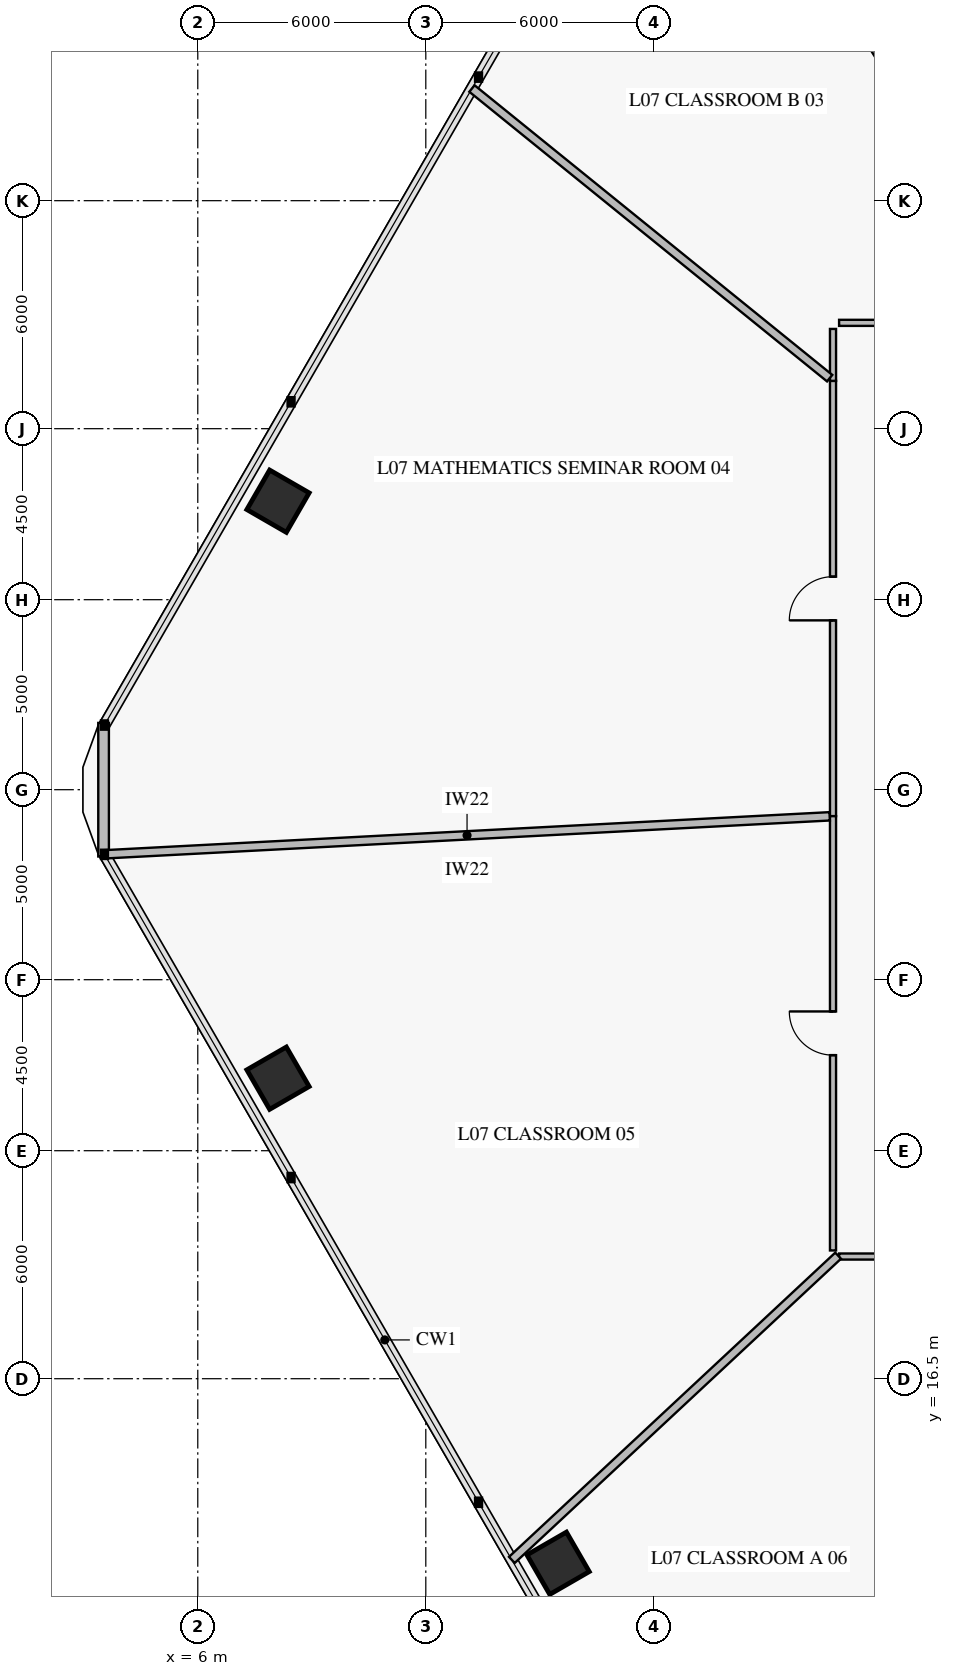
"""IFC4 building model, lengths in metres.
Left out: names, types, materials, properties, quantities, classifications, styles, units other than length and angle.
Written with IfcOpenShell. Run it as: python <this file> out.ifc"""

import sys

from ifc_helpers import new_model, si_unit, direction, frame, frame_2d, origin, origin_2d, place, context, subcontext, project, spatial, rectangle, extrude, element, fill, save


model = new_model("IFC4")
c1 = context("Model", 3, precision=1e-05, world=origin(), true_north=direction((0.0, 1.0)))
c2 = subcontext(c1, "Body", "Model", "MODEL_VIEW")
j1 = project(units=[si_unit("LENGTHUNIT", "METRE"), si_unit("PLANEANGLEUNIT", "RADIAN")], contexts=[c1])
p1 = place(None, origin())
s1 = spatial("IfcSite", under=j1, at=p1, CompositionType="ELEMENT")
p2 = place(p1, origin())
s2 = spatial("IfcBuilding", under=s1, at=p2, CompositionType="ELEMENT")
p3 = place(p2, frame((0.0, 0.0, 28.8)))
s3 = spatial("IfcBuildingStorey", under=s2, at=p3, CompositionType="ELEMENT", Elevation=28.8)
for number, where, z_axis, x_axis in (
    (1, (8.111, 39.592, 0.0), (0.0, 0.0, 1.0), (-0.5, -0.866, 0.0)),
    (2, (8.111, 24.408, 0.0), (0.0, 0.0, 1.0), (0.5, -0.866, 0.0)),
    (3, (15.481, 11.643, 0.0), (0.0, 0.0, 1.0), (0.5, -0.866, 0.0)),
):
    element("IfcColumn", number, at=place(p3, frame(where, z_axis=z_axis, x_axis=x_axis)), inside=s3, PredefinedType="COLUMN", context=c2, shape_type="SweptSolid", body=[
        extrude(rectangle(XDim=1.2, YDim=1.2, at=origin_2d()), origin(), (0.0, 0.0, 1.0), 3.92),
    ])
p4 = place(p3, frame((3.521, 30.242, 0.0), z_axis=(0.0, 0.0, 1.0), x_axis=(0.0, 1.0, 0.0)))
e4 = element("IfcWall", 4, at=p4, inside=s3, PredefinedType="SOLIDWALL", context=c2, shape_type="SweptSolid", body=[
    extrude(rectangle(XDim=3.515, YDim=0.28, at=frame_2d((1.758, 0.0))), origin(), (0.0, 0.0, 1.0), 3.92),
])
p5 = place(p3, frame((28.323, 44.285, 0.0), z_axis=(0.0, 0.0, 1.0), x_axis=(-1.0, 0.0, 0.0)))
e5 = element("IfcWall", 5, at=p5, inside=s3, PredefinedType="PARTITIONING", context=c2, shape_type="SweptSolid", body=[
    extrude(rectangle(XDim=5.448, YDim=0.16, at=frame_2d((2.724, 0.0))), origin(), (0.0, 0.0, 1.0), 3.22),
])
p6 = place(p5, frame((2.149, 0.0, 0.0)))
e6 = element("IfcOpeningElement", 6, at=p6, cuts=e5, PredefinedType="OPENING", context=c2, shape_type="SweptSolid", body=[
    extrude(rectangle(XDim=1.15, YDim=2.2, at=frame_2d((0.575, 1.1))), frame((0.0, 0.092, 0.0), z_axis=(0.0, -1.0, 0.0), x_axis=(1.0, 0.0, 0.0)), (0.0, 0.0, 1.0), 0.184),
])
p7 = place(p3, frame((22.715, 42.758, 0.0), z_axis=(0.0, 0.0, 1.0), x_axis=(0.0, -1.0, 0.0)))
e7 = element("IfcWall", 7, at=p7, inside=s3, PredefinedType="PARTITIONING", context=c2, shape_type="SweptSolid", body=[
    extrude(rectangle(XDim=11.454, YDim=0.16, at=frame_2d((5.727, 0.0))), origin(), (0.0, 0.0, 1.0), 3.22),
])
p8 = place(p7, frame((5.152, 0.0, 0.0)))
e8 = element("IfcOpeningElement", 8, at=p8, cuts=e7, PredefinedType="OPENING", context=c2, shape_type="SweptSolid", body=[
    extrude(rectangle(XDim=1.15, YDim=2.2, at=frame_2d((0.575, 1.1))), frame((0.0, 0.092, 0.0), z_axis=(0.0, -1.0, 0.0), x_axis=(1.0, 0.0, 0.0)), (0.0, 0.0, 1.0), 0.184),
])
p9 = place(p3, frame((22.715, 31.304, 0.0), z_axis=(0.0, 0.0, 1.0), x_axis=(0.0, -1.0, 0.0)))
e9 = element("IfcWall", 9, at=p9, inside=s3, PredefinedType="PARTITIONING", context=c2, shape_type="SweptSolid", body=[
    extrude(rectangle(XDim=11.429, YDim=0.16, at=frame_2d((5.714, 0.0))), origin(), (0.0, 0.0, 1.0), 3.22),
])
p10 = place(p9, frame((5.139, 0.0, 0.0)))
e10 = element("IfcOpeningElement", 10, at=p10, cuts=e9, PredefinedType="OPENING", context=c2, shape_type="SweptSolid", body=[
    extrude(rectangle(XDim=1.15, YDim=2.2, at=frame_2d((0.575, 1.1))), frame((0.0, 0.092, 0.0), z_axis=(0.0, -1.0, 0.0), x_axis=(1.0, 0.0, 0.0)), (0.0, 0.0, 1.0), 0.184),
])
p11 = place(p3, frame((22.875, 19.715, 0.0), z_axis=(0.0, 0.0, 1.0), x_axis=(1.0, 0.0, 0.0)))
e11 = element("IfcWall", 11, at=p11, inside=s3, PredefinedType="PARTITIONING", context=c2, shape_type="SweptSolid", body=[
    extrude(rectangle(XDim=6.593, YDim=0.16, at=frame_2d((3.296, 0.0))), origin(), (0.0, 0.0, 1.0), 3.22),
])
p12 = place(p11, frame((2.721, 0.0, 0.0)))
e12 = element("IfcOpeningElement", 12, at=p12, cuts=e11, PredefinedType="OPENING", context=c2, shape_type="SweptSolid", body=[
    extrude(rectangle(XDim=1.15, YDim=2.2, at=frame_2d((0.575, 1.1))), frame((0.0, 0.092, 0.0), z_axis=(0.0, -1.0, 0.0), x_axis=(1.0, 0.0, 0.0)), (0.0, 0.0, 1.0), 0.184),
])
p13 = place(p3, frame((28.269, 44.373, 0.0), z_axis=(0.0, 0.0, 1.0), x_axis=(-0.529928627855, 0.848042245044, 0.0)))
e13 = element("IfcWall", 13, at=p13, inside=s3, PredefinedType="PARTITIONING", context=c2, shape_type="SweptSolid", body=[
    extrude(rectangle(XDim=18.103, YDim=0.22, at=frame_2d((9.052, 0.0))), origin(), (0.0, 0.0, 1.0), 3.17),
])
p14 = place(p3, frame((22.715, 44.125, 0.0), z_axis=(0.0, 0.0, 1.0), x_axis=(0.0, -1.0, 0.0)))
e14 = element("IfcWall", 14, at=p14, inside=s3, PredefinedType="PARTITIONING", context=c2, shape_type="SweptSolid", body=[
    extrude(rectangle(XDim=1.367, YDim=0.16, at=frame_2d((0.684, 0.0))), origin(), (0.0, 0.0, 1.0), 3.92),
])
p15 = place(p3, frame((22.627, 42.829, 0.0), z_axis=(0.0, 0.0, 1.0), x_axis=(-0.777142055765, 0.629325214147, 0.0)))
e15 = element("IfcWall", 15, at=p15, inside=s3, PredefinedType="PARTITIONING", context=c2, shape_type="SweptSolid", body=[
    extrude(rectangle(XDim=12.112, YDim=0.22, at=frame_2d((6.056, 0.0))), origin(), (0.0, 0.0, 1.0), 3.17),
])
p16 = place(p3, frame((22.627, 31.299, 0.0), z_axis=(0.0, 0.0, 1.0), x_axis=(-0.99862983793, -0.052330170999, 0.0)))
e16 = element("IfcWall", 16, at=p16, inside=s3, PredefinedType="PARTITIONING", context=c2, shape_type="SweptSolid", body=[
    extrude(rectangle(XDim=19.109, YDim=0.22, at=frame_2d((9.555, 0.0))), origin(), (0.0, 0.0, 1.0), 3.17),
])
p17 = place(p3, frame((22.85, 19.737, 0.0), z_axis=(0.0, 0.0, 1.0), x_axis=(-0.731360864489, -0.681990678744, 0.0)))
e17 = element("IfcWall", 17, at=p17, inside=s3, PredefinedType="PARTITIONING", context=c2, shape_type="SweptSolid", body=[
    extrude(rectangle(XDim=11.74, YDim=0.22, at=frame_2d((5.87, 0.0))), origin(), (0.0, 0.0, 1.0), 3.17),
])
p18 = place(p3, frame((29.421, 19.627, 0.0), z_axis=(0.0, 0.0, 1.0), x_axis=(-0.469469908408, -0.882948472505, 0.0)))
e18 = element("IfcWall", 18, at=p18, inside=s3, PredefinedType="PARTITIONING", context=c2, shape_type="SweptSolid", body=[
    extrude(rectangle(XDim=18.68, YDim=0.22, at=frame_2d((9.34, 0.0))), origin(), (0.0, 0.0, 1.0), 3.17),
])
p19 = place(p8, frame((1.15, 0.0, 0.0), z_axis=(0.0, 0.0, 1.0), x_axis=(-1.0, 0.0, 0.0)))
e19 = element("IfcDoor", 19, at=p19, inside=s3, OperationType="SINGLE_SWING_LEFT", PredefinedType="DOOR", context=c2, shape_type="SweptSolid", body=[
    extrude(rectangle(XDim=1.15, YDim=2.2, at=frame_2d((0.575, 1.1))), frame((0.0, 0.025, 0.0), z_axis=(0.0, -1.0, 0.0), x_axis=(1.0, 0.0, 0.0)), (0.0, 0.0, 1.0), 0.05),
])
fill(e8, e19)
p20 = place(p10, frame((1.15, 0.0, 0.0), z_axis=(0.0, 0.0, 1.0), x_axis=(-1.0, 0.0, 0.0)))
e20 = element("IfcDoor", 20, at=p20, inside=s3, OperationType="SINGLE_SWING_RIGHT", PredefinedType="DOOR", context=c2, shape_type="SweptSolid", body=[
    extrude(rectangle(XDim=1.15, YDim=2.2, at=frame_2d((0.575, 1.1))), frame((0.0, 0.025, 0.0), z_axis=(0.0, -1.0, 0.0), x_axis=(1.0, 0.0, 0.0)), (0.0, 0.0, 1.0), 0.05),
])
fill(e10, e20)
save(model, sys.argv[1])
